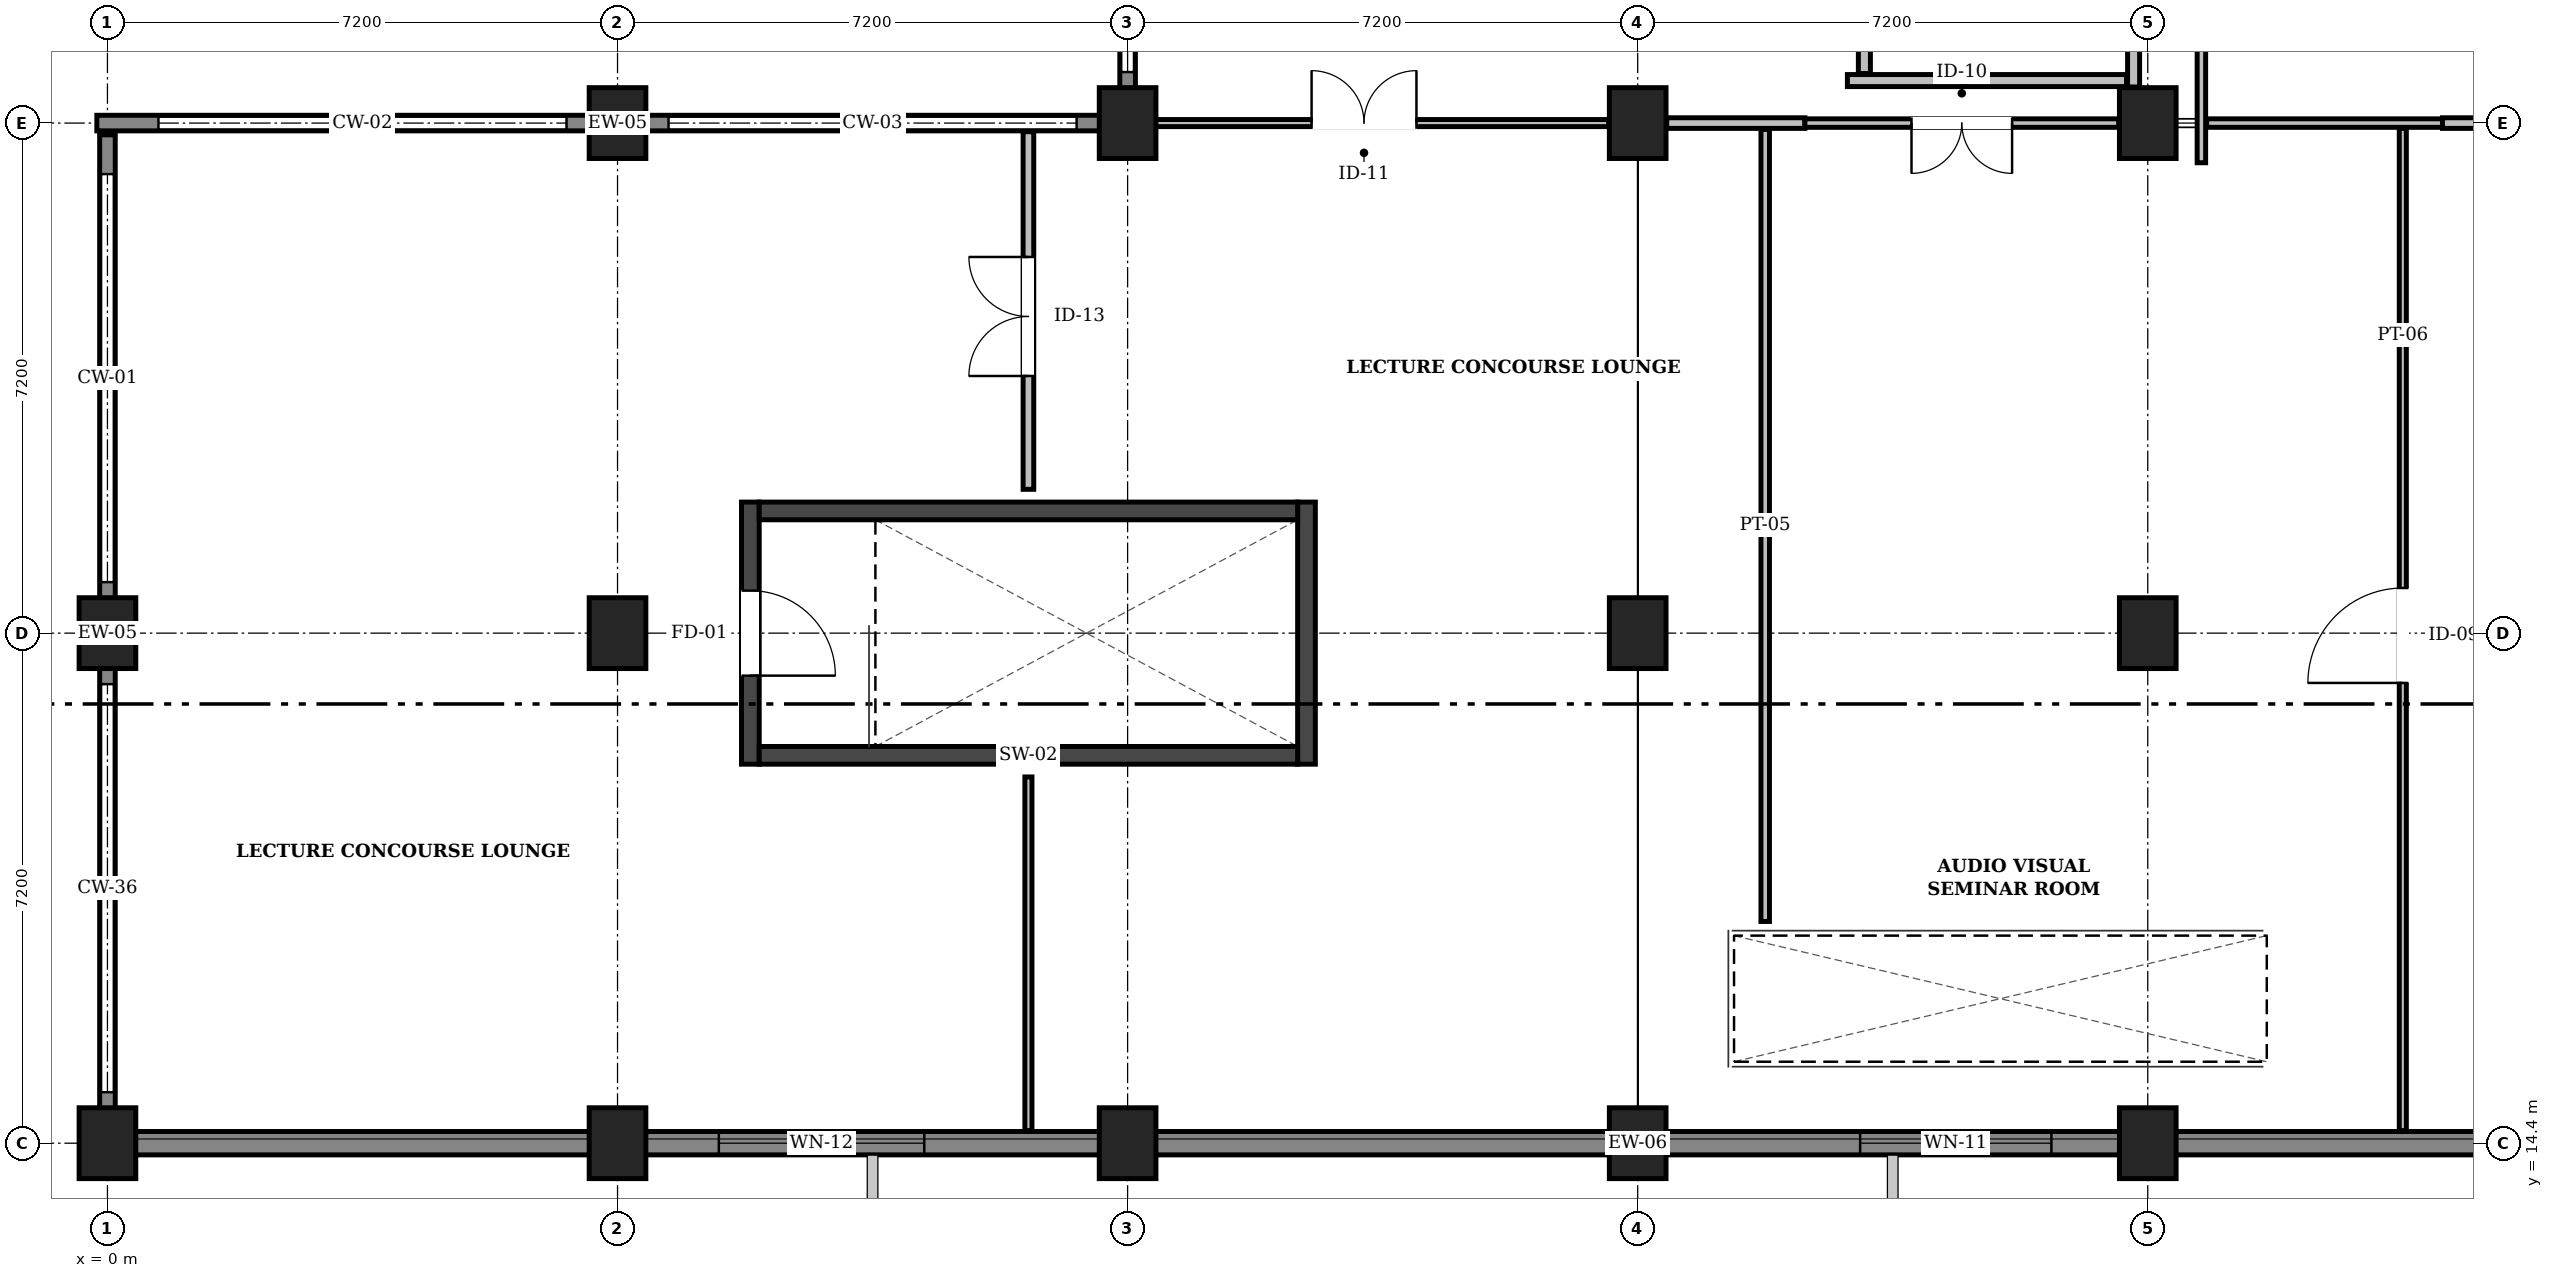
"""IFC4 building model, lengths in metres.
Left out: names, types, materials, properties, quantities, classifications, styles, units other than length and angle.
Written with IfcOpenShell. Run it as: python <this file> out.ifc"""

import sys

from ifc_helpers import new_model, si_unit, direction, frame, frame_2d, origin, origin_2d, place, context, subcontext, project, spatial, rectangle, extrude, element, fill, save


model = new_model("IFC4")
c1 = context("Model", 3, precision=1e-05, world=origin(), true_north=direction((0.0, 1.0)))
c2 = subcontext(c1, "Body", "Model", "MODEL_VIEW")
j1 = project(units=[si_unit("LENGTHUNIT", "METRE"), si_unit("PLANEANGLEUNIT", "RADIAN")], contexts=[c1])
p1 = place(None, origin())
s1 = spatial("IfcSite", under=j1, at=p1, CompositionType="ELEMENT")
p2 = place(p1, origin())
s2 = spatial("IfcBuilding", under=s1, at=p2, CompositionType="ELEMENT")
p3 = place(p2, frame((0.0, 0.0, 14.4)))
s3 = spatial("IfcBuildingStorey", under=s2, at=p3, CompositionType="ELEMENT", Elevation=14.4)
for number, where, z_axis, x_axis in (
    (1, (0.0, 14.4, 0.0), (0.0, 0.0, 1.0), (1.0, 0.0, 0.0)),
    (2, (0.0, 21.6, 0.0), (0.0, 0.0, 1.0), (1.0, 0.0, 0.0)),
    (3, (7.2, 14.4, 0.0), (0.0, 0.0, 1.0), (1.0, 0.0, 0.0)),
    (4, (7.2, 21.6, 0.0), (0.0, 0.0, 1.0), (1.0, 0.0, 0.0)),
    (5, (7.2, 28.8, 0.0), (0.0, 0.0, 1.0), (1.0, 0.0, 0.0)),
    (6, (14.4, 14.4, 0.0), (0.0, 0.0, 1.0), (1.0, 0.0, 0.0)),
    (7, (14.4, 28.8, 0.0), (0.0, 0.0, 1.0), (1.0, 0.0, 0.0)),
    (8, (21.6, 14.4, 0.0), (0.0, 0.0, 1.0), (1.0, 0.0, 0.0)),
    (9, (21.6, 21.6, 0.0), (0.0, 0.0, 1.0), (1.0, 0.0, 0.0)),
    (10, (21.6, 28.8, 0.0), (0.0, 0.0, 1.0), (1.0, 0.0, 0.0)),
    (11, (28.8, 14.4, 0.0), (0.0, 0.0, 1.0), (1.0, 0.0, 0.0)),
    (12, (28.8, 21.6, 0.0), (0.0, 0.0, 1.0), (1.0, 0.0, 0.0)),
    (13, (28.8, 28.8, 0.0), (0.0, 0.0, 1.0), (1.0, 0.0, 0.0)),
):
    element("IfcColumn", number, at=place(p3, frame(where, z_axis=z_axis, x_axis=x_axis)), inside=s3, PredefinedType="COLUMN", context=c2, shape_type="SweptSolid", body=[
        extrude(rectangle(XDim=0.8, YDim=1.0, at=origin_2d()), origin(), (0.0, 0.0, 1.0), 4.5),
    ])
p4 = place(p3, frame((36.0, 14.4, 0.0), z_axis=(0.0, 0.0, 1.0), x_axis=(-1.0, 0.0, 0.0)))
e14 = element("IfcWall", 14, at=p4, inside=s3, PredefinedType="SOLIDWALL", context=c2, shape_type="SweptSolid", body=[
    extrude(rectangle(XDim=7.2, YDim=0.33, at=frame_2d((3.6, 0.0))), origin(), (0.0, 0.0, 1.0), 4.22),
])
p5 = place(p3, frame((28.8, 14.4, 0.0), z_axis=(0.0, 0.0, 1.0), x_axis=(-1.0, 0.0, 0.0)))
e15 = element("IfcWall", 15, at=p5, inside=s3, PredefinedType="SOLIDWALL", context=c2, shape_type="SweptSolid", body=[
    extrude(rectangle(XDim=7.2, YDim=0.33, at=frame_2d((3.6, 0.0))), origin(), (0.0, 0.0, 1.0), 4.22),
])
p6 = place(p5, frame((1.36, 0.0, 0.95)))
e16 = element("IfcOpeningElement", 16, at=p6, cuts=e15, PredefinedType="OPENING", context=c2, shape_type="SweptSolid", body=[
    extrude(rectangle(XDim=2.7, YDim=1.3, at=frame_2d((1.35, 0.65))), frame((0.0, 0.177, 0.0), z_axis=(0.0, -1.0, 0.0), x_axis=(1.0, 0.0, 0.0)), (0.0, 0.0, 1.0), 0.354),
])
p7 = place(p3, frame((21.6, 14.4, 0.0), z_axis=(0.0, 0.0, 1.0), x_axis=(-1.0, 0.0, 0.0)))
e17 = element("IfcWall", 17, at=p7, inside=s3, PredefinedType="SOLIDWALL", context=c2, shape_type="SweptSolid", body=[
    extrude(rectangle(XDim=7.2, YDim=0.33, at=frame_2d((3.6, 0.0))), origin(), (0.0, 0.0, 1.0), 4.22),
])
p8 = place(p3, frame((14.4, 14.4, 0.0), z_axis=(0.0, 0.0, 1.0), x_axis=(-1.0, 0.0, 0.0)))
e18 = element("IfcWall", 18, at=p8, inside=s3, PredefinedType="SOLIDWALL", context=c2, shape_type="SweptSolid", body=[
    extrude(rectangle(XDim=7.2, YDim=0.33, at=frame_2d((3.6, 0.0))), origin(), (0.0, 0.0, 1.0), 4.22),
])
p9 = place(p8, frame((2.87, 0.0, 0.95)))
e19 = element("IfcOpeningElement", 19, at=p9, cuts=e18, PredefinedType="OPENING", context=c2, shape_type="SweptSolid", body=[
    extrude(rectangle(XDim=2.9, YDim=1.3, at=frame_2d((1.45, 0.65))), frame((0.0, 0.177, 0.0), z_axis=(0.0, -1.0, 0.0), x_axis=(1.0, 0.0, 0.0)), (0.0, 0.0, 1.0), 0.354),
])
p10 = place(p3, frame((7.2, 14.4, 0.0), z_axis=(0.0, 0.0, 1.0), x_axis=(-1.0, 0.0, 0.0)))
e20 = element("IfcWall", 20, at=p10, inside=s3, PredefinedType="SOLIDWALL", context=c2, shape_type="SweptSolid", body=[
    extrude(rectangle(XDim=7.35, YDim=0.33, at=frame_2d((3.675, 0.0))), origin(), (0.0, 0.0, 1.0), 4.22),
])
p11 = place(p3, frame((0.0, 14.566, 0.0), z_axis=(0.0, 0.0, 1.0), x_axis=(0.0, 1.0, 0.0)))
e21 = element("IfcWall", 21, at=p11, inside=s3, PredefinedType="SOLIDWALL", context=c2, shape_type="SweptSolid", body=[
    extrude(rectangle(XDim=7.034, YDim=0.22, at=frame_2d((3.517, 0.0))), origin(), (0.0, 0.0, 1.0), 1.24),
])
p12 = place(p3, frame((0.0, 21.6, 0.0), z_axis=(0.0, 0.0, 1.0), x_axis=(0.0, 1.0, 0.0)))
e22 = element("IfcWall", 22, at=p12, inside=s3, PredefinedType="SOLIDWALL", context=c2, shape_type="SweptSolid", body=[
    extrude(rectangle(XDim=7.034, YDim=0.22, at=frame_2d((3.517, 0.0))), origin(), (0.0, 0.0, 1.0), 1.24),
])
p13 = place(p3, frame((-0.15, 28.8, 0.0), z_axis=(0.0, 0.0, 1.0), x_axis=(1.0, 0.0, 0.0)))
e23 = element("IfcWall", 23, at=p13, inside=s3, PredefinedType="SOLIDWALL", context=c2, shape_type="SweptSolid", body=[
    extrude(rectangle(XDim=7.35, YDim=0.22, at=frame_2d((3.675, 0.0))), origin(), (0.0, 0.0, 1.0), 1.24),
])
p14 = place(p3, frame((7.2, 28.8, 0.0), z_axis=(0.0, 0.0, 1.0), x_axis=(1.0, 0.0, 0.0)))
e24 = element("IfcWall", 24, at=p14, inside=s3, PredefinedType="SOLIDWALL", context=c2, shape_type="SweptSolid", body=[
    extrude(rectangle(XDim=7.35, YDim=0.22, at=frame_2d((3.675, 0.0))), origin(), (0.0, 0.0, 1.0), 1.24),
])
p15 = place(p3, frame((14.4, 28.966, 0.0), z_axis=(0.0, 0.0, 1.0), x_axis=(0.0, 1.0, 0.0)))
e25 = element("IfcWall", 25, at=p15, inside=s3, PredefinedType="SOLIDWALL", context=c2, shape_type="SweptSolid", body=[
    extrude(rectangle(XDim=7.034, YDim=0.22, at=frame_2d((3.517, 0.0))), origin(), (0.0, 0.0, 1.0), 1.24),
])
p16 = place(p3, frame((9.075, 19.75, 0.0), z_axis=(0.0, 0.0, 1.0), x_axis=(0.0, 1.0, 0.0)))
e26 = element("IfcWall", 26, at=p16, inside=s3, PredefinedType="SHEAR", context=c2, shape_type="SweptSolid", body=[
    extrude(rectangle(XDim=3.7, YDim=0.25, at=frame_2d((1.85, 0.0))), origin(), (0.0, 0.0, 1.0), 4.25),
])
p17 = place(p16, frame((1.25, 0.0, 0.0)))
e27 = element("IfcOpeningElement", 27, at=p17, cuts=e26, PredefinedType="OPENING", context=c2, shape_type="SweptSolid", body=[
    extrude(rectangle(XDim=1.2, YDim=2.15, at=frame_2d((0.6, 1.075))), frame((0.0, 0.137, 0.0), z_axis=(0.0, -1.0, 0.0), x_axis=(1.0, 0.0, 0.0)), (0.0, 0.0, 1.0), 0.274),
])
p18 = place(p3, frame((16.925, 19.75, 0.0), z_axis=(0.0, 0.0, 1.0), x_axis=(0.0, 1.0, 0.0)))
e28 = element("IfcWall", 28, at=p18, inside=s3, PredefinedType="SHEAR", context=c2, shape_type="SweptSolid", body=[
    extrude(rectangle(XDim=3.7, YDim=0.25, at=frame_2d((1.85, 0.0))), origin(), (0.0, 0.0, 1.0), 4.25),
])
for number, where, z_axis, x_axis in (
    (29, (9.2, 19.875, 0.0), (0.0, 0.0, 1.0), (1.0, 0.0, 0.0)),
    (30, (9.2, 23.325, 0.0), (0.0, 0.0, 1.0), (1.0, 0.0, 0.0)),
):
    element("IfcWall", number, at=place(p3, frame(where, z_axis=z_axis, x_axis=x_axis)), inside=s3, PredefinedType="SHEAR", context=c2, shape_type="SweptSolid", body=[
        extrude(rectangle(XDim=7.6, YDim=0.25, at=frame_2d((3.8, 0.0))), origin(), (0.0, 0.0, 1.0), 4.25),
    ])
p19 = place(p3, frame((28.6, 29.31, 0.0), z_axis=(0.0, 0.0, 1.0), x_axis=(0.0, 1.0, 0.0)))
e31 = element("IfcWall", 31, at=p19, inside=s3, PredefinedType="PARTITIONING", context=c2, shape_type="SweptSolid", body=[
    extrude(rectangle(XDim=3.721, YDim=0.17, at=frame_2d((1.861, 0.0))), origin(), (0.0, 0.0, 1.0), 3.73),
])
p20 = place(p3, frame((24.56, 29.4, 0.0), z_axis=(0.0, 0.0, 1.0), x_axis=(1.0, 0.0, 0.0)))
e32 = element("IfcWall", 32, at=p20, inside=s3, PredefinedType="PARTITIONING", context=c2, shape_type="SweptSolid", body=[
    extrude(rectangle(XDim=3.94, YDim=0.17, at=frame_2d((1.97, 0.0))), origin(), (0.0, 0.0, 1.0), 4.16),
])
p21 = place(p3, frame((24.8, 29.5, 0.0), z_axis=(0.0, 0.0, 1.0), x_axis=(0.0, 1.0, 0.0)))
e33 = element("IfcWall", 33, at=p21, inside=s3, PredefinedType="PARTITIONING", context=c2, shape_type="SweptSolid", body=[
    extrude(rectangle(XDim=8.872, YDim=0.17, at=frame_2d((4.436, 0.0))), origin(), (0.0, 0.0, 1.0), 4.16),
])
p22 = place(p21, frame((3.946, 0.0, 0.0)))
e34 = element("IfcOpeningElement", 34, at=p22, cuts=e33, PredefinedType="OPENING", context=c2, shape_type="SweptSolid", body=[
    extrude(rectangle(XDim=0.98, YDim=2.14, at=frame_2d((0.49, 1.07))), frame((0.0, 0.097, 0.0), z_axis=(0.0, -1.0, 0.0), x_axis=(1.0, 0.0, 0.0)), (0.0, 0.0, 1.0), 0.194),
])
p23 = place(p21, frame((5.671, 0.0, 1.05)))
e35 = element("IfcOpeningElement", 35, at=p23, cuts=e33, PredefinedType="OPENING", context=c2, shape_type="SweptSolid", body=[
    extrude(rectangle(XDim=2.75, YDim=1.15, at=frame_2d((1.375, 0.575))), frame((0.0, 0.097, 0.0), z_axis=(0.0, -1.0, 0.0), x_axis=(1.0, 0.0, 0.0)), (0.0, 0.0, 1.0), 0.194),
])
p24 = place(p3, frame((29.557, 28.24, 0.0), z_axis=(0.0, 0.0, 1.0), x_axis=(0.0, 1.0, 0.0)))
e36 = element("IfcWall", 36, at=p24, inside=s3, PredefinedType="PARTITIONING", context=c2, shape_type="SweptSolid", body=[
    extrude(rectangle(XDim=4.26, YDim=0.12, at=frame_2d((2.13, 0.0))), origin(), (0.0, 0.0, 1.0), 4.16),
])
p25 = place(p3, frame((14.562, 28.8, 0.0), z_axis=(0.0, 0.0, 1.0), x_axis=(1.0, 0.0, 0.0)))
e37 = element("IfcWall", 37, at=p25, inside=s3, PredefinedType="PARTITIONING", context=c2, shape_type="SweptSolid", body=[
    extrude(rectangle(XDim=6.628, YDim=0.1, at=frame_2d((3.314, 0.0))), origin(), (0.0, 0.0, 1.0), 3.7),
])
p26 = place(p25, frame((2.435, 0.0, 0.0)))
e38 = element("IfcOpeningElement", 38, at=p26, cuts=e37, PredefinedType="OPENING", context=c2, shape_type="SweptSolid", body=[
    extrude(rectangle(XDim=1.48, YDim=2.26, at=frame_2d((0.74, 1.13))), frame((0.0, 0.062, 0.0), z_axis=(0.0, -1.0, 0.0), x_axis=(1.0, 0.0, 0.0)), (0.0, 0.0, 1.0), 0.124),
])
p27 = place(p3, frame((22.01, 28.8, 0.0), z_axis=(0.0, 0.0, 1.0), x_axis=(1.0, 0.0, 0.0)))
e39 = element("IfcWall", 39, at=p27, inside=s3, PredefinedType="PARTITIONING", context=c2, shape_type="SweptSolid", body=[
    extrude(rectangle(XDim=1.95, YDim=0.15, at=frame_2d((0.975, 0.0))), origin(), (0.0, 0.0, 1.0), 2.78),
])
p28 = place(p3, frame((23.96, 28.8, 0.0), z_axis=(0.0, 0.0, 1.0), x_axis=(1.0, 0.0, 0.0)))
e40 = element("IfcWall", 40, at=p28, inside=s3, PredefinedType="PARTITIONING", context=c2, shape_type="SweptSolid", body=[
    extrude(rectangle(XDim=4.43, YDim=0.12, at=frame_2d((2.215, 0.0))), origin(), (0.0, 0.0, 1.0), 2.78),
])
p29 = place(p28, frame((1.505, 0.0, 0.0)))
e41 = element("IfcOpeningElement", 41, at=p29, cuts=e40, PredefinedType="OPENING", context=c2, shape_type="SweptSolid", body=[
    extrude(rectangle(XDim=1.42, YDim=2.24, at=frame_2d((0.71, 1.12))), frame((0.0, 0.072, 0.0), z_axis=(0.0, -1.0, 0.0), x_axis=(1.0, 0.0, 0.0)), (0.0, 0.0, 1.0), 0.144),
])
p30 = place(p3, frame((29.632, 28.8, 0.0), z_axis=(0.0, 0.0, 1.0), x_axis=(1.0, 0.0, 0.0)))
e42 = element("IfcWall", 42, at=p30, inside=s3, PredefinedType="PARTITIONING", context=c2, shape_type="SweptSolid", body=[
    extrude(rectangle(XDim=3.328, YDim=0.12, at=frame_2d((1.664, 0.0))), origin(), (0.0, 0.0, 1.0), 3.7),
])
p31 = place(p3, frame((32.96, 28.8, 0.0), z_axis=(0.0, 0.0, 1.0), x_axis=(1.0, 0.0, 0.0)))
e43 = element("IfcWall", 43, at=p31, inside=s3, PredefinedType="PARTITIONING", context=c2, shape_type="SweptSolid", body=[
    extrude(rectangle(XDim=2.63, YDim=0.15, at=frame_2d((1.315, 0.0))), origin(), (0.0, 0.0, 1.0), 3.7),
])
p32 = place(p3, frame((13.0, 14.577, 0.0), z_axis=(0.0, 0.0, 1.0), x_axis=(0.0, 1.0, 0.0)))
e44 = element("IfcWall", 44, at=p32, inside=s3, PredefinedType="PARTITIONING", context=c2, shape_type="SweptSolid", body=[
    extrude(rectangle(XDim=4.993, YDim=0.1, at=frame_2d((2.497, 0.0))), origin(), (0.0, 0.0, 1.0), 4.16),
])
p33 = place(p3, frame((13.0, 23.63, 0.0), z_axis=(0.0, 0.0, 1.0), x_axis=(0.0, 1.0, 0.0)))
e45 = element("IfcWall", 45, at=p33, inside=s3, PredefinedType="PARTITIONING", context=c2, shape_type="SweptSolid", body=[
    extrude(rectangle(XDim=5.048, YDim=0.15, at=frame_2d((2.524, 0.0))), origin(), (0.0, 0.0, 1.0), 4.16),
])
p34 = place(p33, frame((1.6, 0.0, 0.0)))
e46 = element("IfcOpeningElement", 46, at=p34, cuts=e45, PredefinedType="OPENING", context=c2, shape_type="SweptSolid", body=[
    extrude(rectangle(XDim=1.68, YDim=2.28, at=frame_2d((0.84, 1.14))), frame((0.0, 0.087, 0.0), z_axis=(0.0, -1.0, 0.0), x_axis=(1.0, 0.0, 0.0)), (0.0, 0.0, 1.0), 0.174),
])
p35 = place(p3, frame((23.4, 17.53, 0.0), z_axis=(0.0, 0.0, 1.0), x_axis=(0.0, 1.0, 0.0)))
e47 = element("IfcWall", 47, at=p35, inside=s3, PredefinedType="PARTITIONING", context=c2, shape_type="SweptSolid", body=[
    extrude(rectangle(XDim=11.18, YDim=0.12, at=frame_2d((5.59, 0.0))), origin(), (0.0, 0.0, 1.0), 4.16),
])
p36 = place(p3, frame((32.4, 14.577, 0.0), z_axis=(0.0, 0.0, 1.0), x_axis=(0.0, 1.0, 0.0)))
e48 = element("IfcWall", 48, at=p36, inside=s3, PredefinedType="PARTITIONING", context=c2, shape_type="SweptSolid", body=[
    extrude(rectangle(XDim=14.148, YDim=0.1, at=frame_2d((7.074, 0.0))), origin(), (0.0, 0.0, 1.0), 4.16),
])
p37 = place(p36, frame((6.32, 0.0, 0.0)))
e49 = element("IfcOpeningElement", 49, at=p37, cuts=e48, PredefinedType="OPENING", context=c2, shape_type="SweptSolid", body=[
    extrude(rectangle(XDim=1.34, YDim=2.24, at=frame_2d((0.67, 1.12))), frame((0.0, 0.062, 0.0), z_axis=(0.0, -1.0, 0.0), x_axis=(1.0, 0.0, 0.0)), (0.0, 0.0, 1.0), 0.124),
])
p38 = place(p6, origin())
e50 = element("IfcWindow", 50, at=p38, inside=s3, PartitioningType="SINGLE_PANEL", PredefinedType="WINDOW", context=c2, shape_type="SweptSolid", body=[
    extrude(rectangle(XDim=2.7, YDim=1.3, at=frame_2d((1.35, 0.65))), frame((0.0, 0.03, 0.0), z_axis=(0.0, -1.0, 0.0), x_axis=(1.0, 0.0, 0.0)), (0.0, 0.0, 1.0), 0.06),
])
fill(e16, e50)
p39 = place(p9, origin())
e51 = element("IfcWindow", 51, at=p39, inside=s3, PartitioningType="SINGLE_PANEL", PredefinedType="WINDOW", context=c2, shape_type="SweptSolid", body=[
    extrude(rectangle(XDim=2.9, YDim=1.3, at=frame_2d((1.45, 0.65))), frame((0.0, 0.03, 0.0), z_axis=(0.0, -1.0, 0.0), x_axis=(1.0, 0.0, 0.0)), (0.0, 0.0, 1.0), 0.06),
])
fill(e19, e51)
p40 = place(p17, frame((1.2, 0.0, 0.0), z_axis=(0.0, 0.0, 1.0), x_axis=(-1.0, 0.0, 0.0)))
e52 = element("IfcDoor", 52, at=p40, inside=s3, OperationType="SINGLE_SWING_RIGHT", PredefinedType="DOOR", context=c2, shape_type="SweptSolid", body=[
    extrude(rectangle(XDim=1.2, YDim=2.15, at=frame_2d((0.6, 1.075))), frame((0.0, 0.025, 0.0), z_axis=(0.0, -1.0, 0.0), x_axis=(1.0, 0.0, 0.0)), (0.0, 0.0, 1.0), 0.05),
])
fill(e27, e52)
p41 = place(p26, origin())
e53 = element("IfcDoor", 53, at=p41, inside=s3, OperationType="DOUBLE_DOOR_SINGLE_SWING", PredefinedType="DOOR", context=c2, shape_type="SweptSolid", body=[
    extrude(rectangle(XDim=1.48, YDim=2.26, at=frame_2d((0.74, 1.13))), frame((0.0, 0.025, 0.0), z_axis=(0.0, -1.0, 0.0), x_axis=(1.0, 0.0, 0.0)), (0.0, 0.0, 1.0), 0.05),
])
fill(e38, e53)
p42 = place(p34, origin())
e54 = element("IfcDoor", 54, at=p42, inside=s3, OperationType="DOUBLE_DOOR_SINGLE_SWING", PredefinedType="DOOR", context=c2, shape_type="SweptSolid", body=[
    extrude(rectangle(XDim=1.68, YDim=2.28, at=frame_2d((0.84, 1.14))), frame((0.0, 0.025, 0.0), z_axis=(0.0, -1.0, 0.0), x_axis=(1.0, 0.0, 0.0)), (0.0, 0.0, 1.0), 0.05),
])
fill(e46, e54)
p43 = place(p37, origin())
e55 = element("IfcDoor", 55, at=p43, inside=s3, OperationType="SINGLE_SWING_LEFT", PredefinedType="DOOR", context=c2, shape_type="SweptSolid", body=[
    extrude(rectangle(XDim=1.34, YDim=2.24, at=frame_2d((0.67, 1.12))), frame((0.0, 0.025, 0.0), z_axis=(0.0, -1.0, 0.0), x_axis=(1.0, 0.0, 0.0)), (0.0, 0.0, 1.0), 0.05),
])
fill(e49, e55)
p44 = place(p29, frame((1.42, 0.0, 0.0), z_axis=(0.0, 0.0, 1.0), x_axis=(-1.0, 0.0, 0.0)))
e56 = element("IfcDoor", 56, at=p44, inside=s3, OperationType="DOUBLE_DOOR_SINGLE_SWING", PredefinedType="DOOR", context=c2, shape_type="SweptSolid", body=[
    extrude(rectangle(XDim=1.42, YDim=2.24, at=frame_2d((0.71, 1.12))), frame((0.0, 0.025, 0.0), z_axis=(0.0, -1.0, 0.0), x_axis=(1.0, 0.0, 0.0)), (0.0, 0.0, 1.0), 0.05),
])
fill(e41, e56)
save(model, sys.argv[1])
